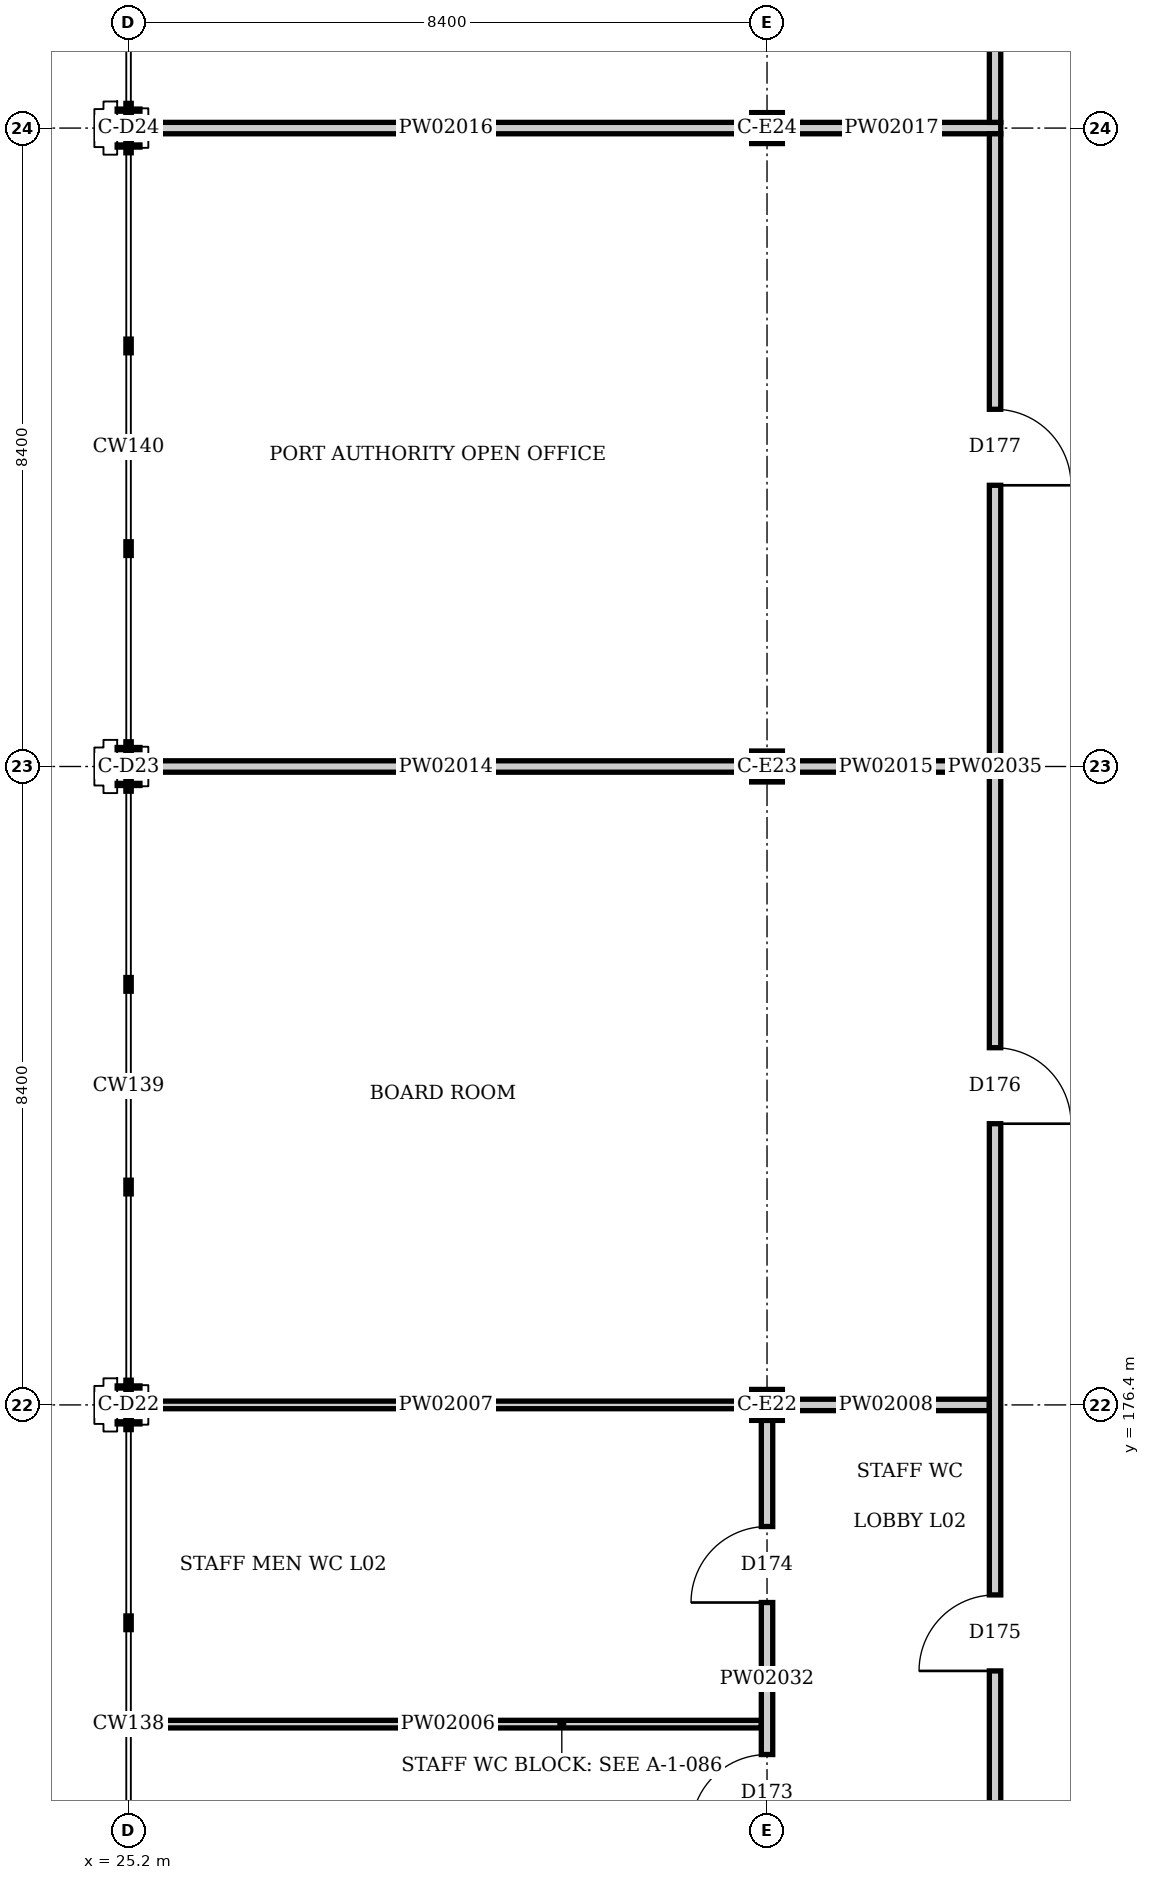
"""IFC4 building model, lengths in metres.
Left out: names, types, materials, properties, quantities, classifications, styles, units other than length and angle.
Written with IfcOpenShell. Run it as: python <this file> out.ifc"""

import sys

from ifc_helpers import new_model, si_unit, direction, frame, frame_2d, origin, origin_2d, place, context, subcontext, project, spatial, rectangle, i_section, extrude, element, fill, save


model = new_model("IFC4")
c1 = context("Model", 3, precision=1e-05, world=origin(), true_north=direction((0.0, 1.0)))
c2 = subcontext(c1, "Body", "Model", "MODEL_VIEW")
j1 = project(units=[si_unit("LENGTHUNIT", "METRE"), si_unit("PLANEANGLEUNIT", "RADIAN")], contexts=[c1])
p1 = place(None, origin())
s1 = spatial("IfcSite", under=j1, at=p1, CompositionType="ELEMENT")
p2 = place(p1, origin())
s2 = spatial("IfcBuilding", under=s1, at=p2, CompositionType="ELEMENT")
p3 = place(p2, frame((0.0, 0.0, 10.8)))
s3 = spatial("IfcBuildingStorey", under=s2, at=p3, CompositionType="ELEMENT", Elevation=10.8)
for number, where, z_axis, x_axis in (
    (1, (25.2, 176.4, 0.0), (0.0, 0.0, 1.0), (1.0, 0.0, 0.0)),
    (2, (25.2, 184.8, 0.0), (0.0, 0.0, 1.0), (1.0, 0.0, 0.0)),
    (3, (25.2, 193.2, 0.0), (0.0, 0.0, 1.0), (1.0, 0.0, 0.0)),
):
    element("IfcColumn", number, at=place(p3, frame(where, z_axis=z_axis, x_axis=x_axis)), inside=s3, PredefinedType="COLUMN", context=c2, shape_type="SweptSolid", body=[
        extrude(i_section(OverallWidth=0.3, OverallDepth=0.5, WebThickness=0.014, FlangeThickness=0.028, at=origin_2d()), origin(), (0.0, 0.0, 1.0), 6.3),
    ])
for number, where, z_axis, x_axis in (
    (4, (33.6, 176.4, 0.0), (0.0, 0.0, 1.0), (1.0, 0.0, 0.0)),
    (5, (33.6, 184.8, 0.0), (0.0, 0.0, 1.0), (1.0, 0.0, 0.0)),
    (6, (33.6, 193.2, 0.0), (0.0, 0.0, 1.0), (1.0, 0.0, 0.0)),
):
    element("IfcColumn", number, at=place(p3, frame(where, z_axis=z_axis, x_axis=x_axis)), inside=s3, PredefinedType="COLUMN", context=c2, shape_type="SweptSolid", body=[
        extrude(i_section(OverallWidth=0.404, OverallDepth=0.407, WebThickness=0.027, FlangeThickness=0.044, at=origin_2d()), origin(), (0.0, 0.0, 1.0), 6.3),
    ])
p4 = place(p3, frame((25.275, 172.2, 0.0), z_axis=(0.0, 0.0, 1.0), x_axis=(1.0, 0.0, 0.0)))
e7 = element("IfcWall", 7, at=p4, inside=s3, PredefinedType="PARTITIONING", context=c2, shape_type="SweptSolid", body=[
    extrude(rectangle(XDim=8.25, YDim=0.1, at=frame_2d((4.125, 0.0))), origin(), (0.0, 0.0, 1.0), 6.05),
])
p5 = place(p3, frame((25.35, 176.4, 0.0), z_axis=(0.0, 0.0, 1.0), x_axis=(1.0, 0.0, 0.0)))
e8 = element("IfcWall", 8, at=p5, inside=s3, PredefinedType="PARTITIONING", context=c2, shape_type="SweptSolid", body=[
    extrude(rectangle(XDim=8.048, YDim=0.1, at=frame_2d((4.024, 0.0))), origin(), (0.0, 0.0, 1.0), 5.596),
])
p6 = place(p3, frame((33.802, 176.4, 0.0), z_axis=(0.0, 0.0, 1.0), x_axis=(1.0, 0.0, 0.0)))
e9 = element("IfcWall", 9, at=p6, inside=s3, PredefinedType="PARTITIONING", context=c2, shape_type="SweptSolid", body=[
    extrude(rectangle(XDim=2.723, YDim=0.15, at=frame_2d((1.361, 0.0))), origin(), (0.0, 0.0, 1.0), 5.596),
])
p7 = place(p3, frame((25.35, 184.8, 0.0), z_axis=(0.0, 0.0, 1.0), x_axis=(1.0, 0.0, 0.0)))
e10 = element("IfcWall", 10, at=p7, inside=s3, PredefinedType="PARTITIONING", context=c2, shape_type="SweptSolid", body=[
    extrude(rectangle(XDim=8.048, YDim=0.15, at=frame_2d((4.024, 0.0))), origin(), (0.0, 0.0, 1.0), 5.596),
])
p8 = place(p3, frame((33.802, 184.8, 0.0), z_axis=(0.0, 0.0, 1.0), x_axis=(1.0, 0.0, 0.0)))
e11 = element("IfcWall", 11, at=p8, inside=s3, PredefinedType="PARTITIONING", context=c2, shape_type="SweptSolid", body=[
    extrude(rectangle(XDim=2.723, YDim=0.15, at=frame_2d((1.361, 0.0))), origin(), (0.0, 0.0, 1.0), 5.596),
])
p9 = place(p3, frame((25.35, 193.2, 0.0), z_axis=(0.0, 0.0, 1.0), x_axis=(1.0, 0.0, 0.0)))
e12 = element("IfcWall", 12, at=p9, inside=s3, PredefinedType="PARTITIONING", context=c2, shape_type="SweptSolid", body=[
    extrude(rectangle(XDim=8.048, YDim=0.15, at=frame_2d((4.024, 0.0))), origin(), (0.0, 0.0, 1.0), 5.596),
])
p10 = place(p3, frame((33.802, 193.2, 0.0), z_axis=(0.0, 0.0, 1.0), x_axis=(1.0, 0.0, 0.0)))
e13 = element("IfcWall", 13, at=p10, inside=s3, PredefinedType="PARTITIONING", context=c2, shape_type="SweptSolid", body=[
    extrude(rectangle(XDim=2.873, YDim=0.15, at=frame_2d((1.437, 0.0))), origin(), (0.0, 0.0, 1.0), 5.596),
])
p11 = place(p3, frame((33.6, 170.475, 0.0), z_axis=(0.0, 0.0, 1.0), x_axis=(0.0, 1.0, 0.0)))
e14 = element("IfcWall", 14, at=p11, inside=s3, PredefinedType="PARTITIONING", context=c2, shape_type="SweptSolid", body=[
    extrude(rectangle(XDim=5.721, YDim=0.15, at=frame_2d((2.861, 0.0))), origin(), (0.0, 0.0, 1.0), 5.596),
])
p12 = place(p11, frame((0.325, 0.0, 0.0)))
e15 = element("IfcOpeningElement", 15, at=p12, cuts=e14, PredefinedType="OPENING", context=c2, shape_type="SweptSolid", body=[
    extrude(rectangle(XDim=1.0, YDim=2.1, at=frame_2d((0.5, 1.05))), frame((0.0, 0.085, 0.0), z_axis=(0.0, -1.0, 0.0), x_axis=(1.0, 0.0, 0.0)), (0.0, 0.0, 1.0), 0.17),
])
p13 = place(p11, frame((3.325, 0.0, 0.0)))
e16 = element("IfcOpeningElement", 16, at=p13, cuts=e14, PredefinedType="OPENING", context=c2, shape_type="SweptSolid", body=[
    extrude(rectangle(XDim=1.0, YDim=2.1, at=frame_2d((0.5, 1.05))), frame((0.0, 0.085, 0.0), z_axis=(0.0, -1.0, 0.0), x_axis=(1.0, 0.0, 0.0)), (0.0, 0.0, 1.0), 0.17),
])
p14 = place(p3, frame((36.6, 168.0, 0.0), z_axis=(0.0, 0.0, 1.0), x_axis=(0.0, 1.0, 0.0)))
e17 = element("IfcWall", 17, at=p14, inside=s3, PredefinedType="PARTITIONING", context=c2, shape_type="SweptSolid", body=[
    extrude(rectangle(XDim=25.125, YDim=0.15, at=frame_2d((12.562, 0.0))), origin(), (0.0, 0.0, 1.0), 6.05),
])
p15 = place(p14, frame((4.9, 0.0, 0.0)))
e18 = element("IfcOpeningElement", 18, at=p15, cuts=e17, PredefinedType="OPENING", context=c2, shape_type="SweptSolid", body=[
    extrude(rectangle(XDim=1.0, YDim=2.1, at=frame_2d((0.5, 1.05))), frame((0.0, 0.085, 0.0), z_axis=(0.0, -1.0, 0.0), x_axis=(1.0, 0.0, 0.0)), (0.0, 0.0, 1.0), 0.17),
])
p16 = place(p14, frame((12.1, 0.0, 0.0)))
e19 = element("IfcOpeningElement", 19, at=p16, cuts=e17, PredefinedType="OPENING", context=c2, shape_type="SweptSolid", body=[
    extrude(rectangle(XDim=1.0, YDim=2.1, at=frame_2d((0.5, 1.05))), frame((0.0, 0.085, 0.0), z_axis=(0.0, -1.0, 0.0), x_axis=(1.0, 0.0, 0.0)), (0.0, 0.0, 1.0), 0.17),
])
p17 = place(p14, frame((20.5, 0.0, 0.0)))
e20 = element("IfcOpeningElement", 20, at=p17, cuts=e17, PredefinedType="OPENING", context=c2, shape_type="SweptSolid", body=[
    extrude(rectangle(XDim=1.0, YDim=2.1, at=frame_2d((0.5, 1.05))), frame((0.0, 0.085, 0.0), z_axis=(0.0, -1.0, 0.0), x_axis=(1.0, 0.0, 0.0)), (0.0, 0.0, 1.0), 0.17),
])
p18 = place(p3, frame((36.6, 193.275, 0.0), z_axis=(0.0, 0.0, 1.0), x_axis=(0.0, 1.0, 0.0)))
e21 = element("IfcWall", 21, at=p18, inside=s3, PredefinedType="PARTITIONING", context=c2, shape_type="SweptSolid", body=[
    extrude(rectangle(XDim=8.325, YDim=0.15, at=frame_2d((4.163, 0.0))), origin(), (0.0, 0.0, 1.0), 6.05),
])
p19 = place(p18, frame((3.625, 0.0, 0.0)))
e22 = element("IfcOpeningElement", 22, at=p19, cuts=e21, PredefinedType="OPENING", context=c2, shape_type="SweptSolid", body=[
    extrude(rectangle(XDim=1.0, YDim=2.1, at=frame_2d((0.5, 1.05))), frame((0.0, 0.085, 0.0), z_axis=(0.0, -1.0, 0.0), x_axis=(1.0, 0.0, 0.0)), (0.0, 0.0, 1.0), 0.17),
])
p20 = place(p12, origin())
e23 = element("IfcDoor", 23, at=p20, inside=s3, OperationType="SINGLE_SWING_LEFT", PredefinedType="DOOR", context=c2, shape_type="SweptSolid", body=[
    extrude(rectangle(XDim=1.0, YDim=2.1, at=frame_2d((0.5, 1.05))), frame((0.0, 0.025, 0.0), z_axis=(0.0, -1.0, 0.0), x_axis=(1.0, 0.0, 0.0)), (0.0, 0.0, 1.0), 0.05),
])
fill(e15, e23)
p21 = place(p13, origin())
e24 = element("IfcDoor", 24, at=p21, inside=s3, OperationType="SINGLE_SWING_LEFT", PredefinedType="DOOR", context=c2, shape_type="SweptSolid", body=[
    extrude(rectangle(XDim=1.0, YDim=2.1, at=frame_2d((0.5, 1.05))), frame((0.0, 0.025, 0.0), z_axis=(0.0, -1.0, 0.0), x_axis=(1.0, 0.0, 0.0)), (0.0, 0.0, 1.0), 0.05),
])
fill(e16, e24)
p22 = place(p15, origin())
e25 = element("IfcDoor", 25, at=p22, inside=s3, OperationType="SINGLE_SWING_LEFT", PredefinedType="DOOR", context=c2, shape_type="SweptSolid", body=[
    extrude(rectangle(XDim=1.0, YDim=2.1, at=frame_2d((0.5, 1.05))), frame((0.0, 0.025, 0.0), z_axis=(0.0, -1.0, 0.0), x_axis=(1.0, 0.0, 0.0)), (0.0, 0.0, 1.0), 0.05),
])
fill(e18, e25)
p23 = place(p16, frame((1.0, 0.0, 0.0), z_axis=(0.0, 0.0, 1.0), x_axis=(-1.0, 0.0, 0.0)))
e26 = element("IfcDoor", 26, at=p23, inside=s3, OperationType="SINGLE_SWING_RIGHT", PredefinedType="DOOR", context=c2, shape_type="SweptSolid", body=[
    extrude(rectangle(XDim=1.0, YDim=2.1, at=frame_2d((0.5, 1.05))), frame((0.0, 0.025, 0.0), z_axis=(0.0, -1.0, 0.0), x_axis=(1.0, 0.0, 0.0)), (0.0, 0.0, 1.0), 0.05),
])
fill(e19, e26)
p24 = place(p17, frame((1.0, 0.0, 0.0), z_axis=(0.0, 0.0, 1.0), x_axis=(-1.0, 0.0, 0.0)))
e27 = element("IfcDoor", 27, at=p24, inside=s3, OperationType="SINGLE_SWING_RIGHT", PredefinedType="DOOR", context=c2, shape_type="SweptSolid", body=[
    extrude(rectangle(XDim=1.0, YDim=2.1, at=frame_2d((0.5, 1.05))), frame((0.0, 0.025, 0.0), z_axis=(0.0, -1.0, 0.0), x_axis=(1.0, 0.0, 0.0)), (0.0, 0.0, 1.0), 0.05),
])
fill(e20, e27)
save(model, sys.argv[1])
